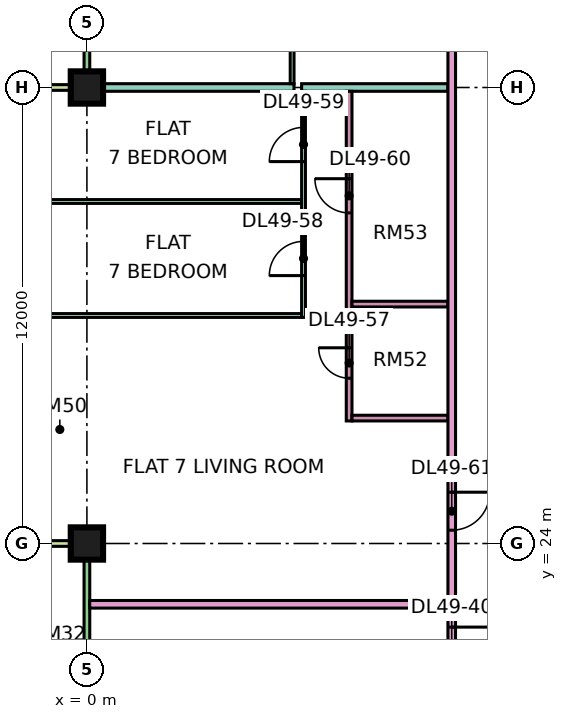
"""IFC4 building model, lengths in metres.
Left out: names, types, materials, properties, quantities, classifications, styles, units other than length and angle.
Written with IfcOpenShell. Run it as: python <this file> out.ifc"""

import sys

from ifc_helpers import new_model, si_unit, direction, frame, frame_2d, origin, origin_2d, place, context, subcontext, project, spatial, rectangle, extrude, element, fill, save


model = new_model("IFC4")
c1 = context("Model", 3, precision=1e-05, world=origin(), true_north=direction((0.0, 1.0)))
c2 = subcontext(c1, "Body", "Model", "MODEL_VIEW")
j1 = project(units=[si_unit("LENGTHUNIT", "METRE"), si_unit("PLANEANGLEUNIT", "RADIAN")], contexts=[c1])
p1 = place(None, origin())
s1 = spatial("IfcSite", under=j1, at=p1, CompositionType="ELEMENT")
p2 = place(p1, origin())
s2 = spatial("IfcBuilding", under=s1, at=p2, CompositionType="ELEMENT")
p3 = place(p2, frame((0.0, 0.0, 211.65)))
s3 = spatial("IfcBuildingStorey", under=s2, at=p3, CompositionType="ELEMENT", Elevation=211.65)
p4 = place(p3, frame((0.0, 24.0, 0.0), z_axis=(0.0, 0.0, 1.0), x_axis=(1.0, 0.0, 0.0)))
e1 = element("IfcColumn", 1, at=p4, inside=s3, PredefinedType="COLUMN", context=c2, shape_type="SweptSolid", body=[
    extrude(rectangle(XDim=0.85, YDim=0.85, at=origin_2d()), origin(), (0.0, 0.0, 1.0), 3.75),
])
p5 = place(p3, frame((0.0, 36.0, 0.0), z_axis=(0.0, 0.0, 1.0), x_axis=(1.0, 0.0, 0.0)))
e2 = element("IfcColumn", 2, at=p5, inside=s3, PredefinedType="COLUMN", context=c2, shape_type="SweptSolid", body=[
    extrude(rectangle(XDim=0.85, YDim=0.85, at=origin_2d()), origin(), (0.0, 0.0, 1.0), 3.75),
])
p6 = place(p3, frame((0.0, 47.925, 0.0), z_axis=(0.0, 0.0, 1.0), x_axis=(0.0, -1.0, 0.0)))
e3 = element("IfcWall", 3, at=p6, inside=s3, PredefinedType="SOLIDWALL", context=c2, shape_type="SweptSolid", body=[
    extrude(rectangle(XDim=11.85, YDim=0.15, at=frame_2d((5.925, 0.0))), origin(), (0.0, 0.0, 1.0), 3.35),
])
p7 = place(p6, frame((0.6, 0.0, 0.45)))
e4 = element("IfcOpeningElement", 4, at=p7, cuts=e3, PredefinedType="OPENING", context=c2, shape_type="SweptSolid", body=[
    extrude(rectangle(XDim=1.2, YDim=2.4, at=frame_2d((0.6, 1.2))), frame((0.0, 0.085, 0.0), z_axis=(0.0, -1.0, 0.0), x_axis=(1.0, 0.0, 0.0)), (0.0, 0.0, 1.0), 0.17),
])
p8 = place(p6, frame((4.087, 0.0, 0.0)))
e5 = element("IfcOpeningElement", 5, at=p8, cuts=e3, PredefinedType="OPENING", context=c2, shape_type="SweptSolid", body=[
    extrude(rectangle(XDim=1.2, YDim=2.4, at=frame_2d((0.6, 1.2))), frame((0.0, 0.085, 0.0), z_axis=(0.0, -1.0, 0.0), x_axis=(1.0, 0.0, 0.0)), (0.0, 0.0, 1.0), 0.17),
])
p9 = place(p6, frame((6.525, 0.0, 0.45)))
e6 = element("IfcOpeningElement", 6, at=p9, cuts=e3, PredefinedType="OPENING", context=c2, shape_type="SweptSolid", body=[
    extrude(rectangle(XDim=1.8, YDim=2.4, at=frame_2d((0.9, 1.2))), frame((0.0, 0.085, 0.0), z_axis=(0.0, -1.0, 0.0), x_axis=(1.0, 0.0, 0.0)), (0.0, 0.0, 1.0), 0.17),
])
p10 = place(p6, frame((9.562, 0.0, 0.45)))
e7 = element("IfcOpeningElement", 7, at=p10, cuts=e3, PredefinedType="OPENING", context=c2, shape_type="SweptSolid", body=[
    extrude(rectangle(XDim=1.2, YDim=2.4, at=frame_2d((0.6, 1.2))), frame((0.0, 0.085, 0.0), z_axis=(0.0, -1.0, 0.0), x_axis=(1.0, 0.0, 0.0)), (0.0, 0.0, 1.0), 0.17),
])
p11 = place(p3, frame((-1.5, 36.0, 0.0), z_axis=(0.0, 0.0, 1.0), x_axis=(1.0, 0.0, 0.0)))
e8 = element("IfcWall", 8, at=p11, inside=s3, PredefinedType="SOLIDWALL", context=c2, shape_type="SweptSolid", body=[
    extrude(rectangle(XDim=1.5, YDim=0.15, at=frame_2d((0.75, 0.0))), origin(), (0.0, 0.0, 1.0), 3.35),
])
p12 = place(p3, frame((0.0, 23.925, 0.0), z_axis=(0.0, 0.0, 1.0), x_axis=(0.0, -1.0, 0.0)))
e9 = element("IfcWall", 9, at=p12, inside=s3, PredefinedType="SOLIDWALL", context=c2, shape_type="SweptSolid", body=[
    extrude(rectangle(XDim=11.35, YDim=0.15, at=frame_2d((5.675, 0.0))), origin(), (0.0, 0.0, 1.0), 3.35),
])
p13 = place(p12, frame((6.738, 0.0, 0.0)))
e10 = element("IfcOpeningElement", 10, at=p13, cuts=e9, PredefinedType="OPENING", context=c2, shape_type="SweptSolid", body=[
    extrude(rectangle(XDim=1.8, YDim=2.4, at=frame_2d((0.9, 1.2))), frame((0.0, 0.085, 0.0), z_axis=(0.0, -1.0, 0.0), x_axis=(1.0, 0.0, 0.0)), (0.0, 0.0, 1.0), 0.17),
])
p14 = place(p3, frame((-1.5, 24.0, 0.0), z_axis=(0.0, 0.0, 1.0), x_axis=(1.0, 0.0, 0.0)))
e11 = element("IfcWall", 11, at=p14, inside=s3, PredefinedType="SOLIDWALL", context=c2, shape_type="SweptSolid", body=[
    extrude(rectangle(XDim=1.5, YDim=0.15, at=frame_2d((0.75, 0.0))), origin(), (0.0, 0.0, 1.0), 3.35),
])
p15 = place(p3, frame((-1.351, 33.0, 0.0), z_axis=(0.0, 0.0, 1.0), x_axis=(1.0, 0.0, 0.0)))
e12 = element("IfcWall", 12, at=p15, inside=s3, PredefinedType="PARTITIONING", context=c2, shape_type="SweptSolid", body=[
    extrude(rectangle(XDim=7.001, YDim=0.1, at=frame_2d((3.5, 0.0))), origin(), (0.0, 0.0, 1.0), 3.35),
])
p16 = place(p3, frame((-1.35, 30.0, 0.0), z_axis=(0.0, 0.0, 1.0), x_axis=(1.0, 0.0, 0.0)))
e13 = element("IfcWall", 13, at=p16, inside=s3, PredefinedType="PARTITIONING", context=c2, shape_type="SweptSolid", body=[
    extrude(rectangle(XDim=7.0, YDim=0.1, at=frame_2d((3.5, 0.0))), origin(), (0.0, 0.0, 1.0), 3.35),
])
e14 = element("IfcWall", 14, at=p5, inside=s3, PredefinedType="PARTITIONING", context=c2, shape_type="SweptSolid", body=[
    extrude(rectangle(XDim=5.45, YDim=0.2, at=frame_2d((2.725, 0.0))), origin(), (0.0, 0.0, 1.0), 3.35),
])
p17 = place(p3, frame((0.074, 22.4, 0.0), z_axis=(0.0, 0.0, 1.0), x_axis=(1.0, 0.0, 0.0)))
e15 = element("IfcWall", 15, at=p17, inside=s3, PredefinedType="PARTITIONING", context=c2, shape_type="SweptSolid", body=[
    extrude(rectangle(XDim=9.426, YDim=0.2, at=frame_2d((4.713, 0.0))), origin(), (0.0, 0.0, 1.0), 3.35),
])
p18 = place(p3, frame((5.4, 36.1, 0.0), z_axis=(0.0, 0.0, 1.0), x_axis=(0.0, 1.0, 0.0)))
e16 = element("IfcWall", 16, at=p18, inside=s3, PredefinedType="PARTITIONING", context=c2, shape_type="SweptSolid", body=[
    extrude(rectangle(XDim=26.95, YDim=0.1, at=frame_2d((13.475, 0.0))), origin(), (0.0, 0.0, 1.0), 3.35),
])
p19 = place(p18, frame((0.95, 0.0, 0.0)))
e17 = element("IfcOpeningElement", 17, at=p19, cuts=e16, PredefinedType="OPENING", context=c2, shape_type="SweptSolid", body=[
    extrude(rectangle(XDim=0.9, YDim=2.1, at=frame_2d((0.45, 1.05))), frame((0.0, 0.06, 0.0), z_axis=(0.0, -1.0, 0.0), x_axis=(1.0, 0.0, 0.0)), (0.0, 0.0, 1.0), 0.12),
])
p20 = place(p18, frame((3.95, 0.0, 0.0)))
e18 = element("IfcOpeningElement", 18, at=p20, cuts=e16, PredefinedType="OPENING", context=c2, shape_type="SweptSolid", body=[
    extrude(rectangle(XDim=0.9, YDim=2.1, at=frame_2d((0.45, 1.05))), frame((0.0, 0.06, 0.0), z_axis=(0.0, -1.0, 0.0), x_axis=(1.0, 0.0, 0.0)), (0.0, 0.0, 1.0), 0.12),
])
p21 = place(p18, frame((15.95, 0.0, 0.0)))
e19 = element("IfcOpeningElement", 19, at=p21, cuts=e16, PredefinedType="OPENING", context=c2, shape_type="SweptSolid", body=[
    extrude(rectangle(XDim=0.9, YDim=2.1, at=frame_2d((0.45, 1.05))), frame((0.0, 0.06, 0.0), z_axis=(0.0, -1.0, 0.0), x_axis=(1.0, 0.0, 0.0)), (0.0, 0.0, 1.0), 0.12),
])
p22 = place(p18, frame((18.95, 0.0, 0.0)))
e20 = element("IfcOpeningElement", 20, at=p22, cuts=e16, PredefinedType="OPENING", context=c2, shape_type="SweptSolid", body=[
    extrude(rectangle(XDim=0.9, YDim=2.1, at=frame_2d((0.45, 1.05))), frame((0.0, 0.06, 0.0), z_axis=(0.0, -1.0, 0.0), x_axis=(1.0, 0.0, 0.0)), (0.0, 0.0, 1.0), 0.12),
])
p23 = place(p18, frame((21.95, 0.0, 0.0)))
e21 = element("IfcOpeningElement", 21, at=p23, cuts=e16, PredefinedType="OPENING", context=c2, shape_type="SweptSolid", body=[
    extrude(rectangle(XDim=0.9, YDim=2.1, at=frame_2d((0.45, 1.05))), frame((0.0, 0.06, 0.0), z_axis=(0.0, -1.0, 0.0), x_axis=(1.0, 0.0, 0.0)), (0.0, 0.0, 1.0), 0.12),
])
p24 = place(p18, frame((9.95, 0.0, 0.0)))
e22 = element("IfcOpeningElement", 22, at=p24, cuts=e16, PredefinedType="OPENING", context=c2, shape_type="SweptSolid", body=[
    extrude(rectangle(XDim=0.9, YDim=2.1, at=frame_2d((0.45, 1.05))), frame((0.0, 0.06, 0.0), z_axis=(0.0, -1.0, 0.0), x_axis=(1.0, 0.0, 0.0)), (0.0, 0.0, 1.0), 0.12),
])
p25 = place(p18, frame((24.55, 0.0, 0.0)))
e23 = element("IfcOpeningElement", 23, at=p25, cuts=e16, PredefinedType="OPENING", context=c2, shape_type="SweptSolid", body=[
    extrude(rectangle(XDim=1.6, YDim=2.1, at=frame_2d((0.8, 1.05))), frame((0.0, 0.06, 0.0), z_axis=(0.0, -1.0, 0.0), x_axis=(1.0, 0.0, 0.0)), (0.0, 0.0, 1.0), 0.12),
])
p26 = place(p3, frame((5.65, 36.0, 0.0), z_axis=(0.0, 0.0, 1.0), x_axis=(1.0, 0.0, 0.0)))
e24 = element("IfcWall", 24, at=p26, inside=s3, PredefinedType="PARTITIONING", context=c2, shape_type="SweptSolid", body=[
    extrude(rectangle(XDim=3.85, YDim=0.2, at=frame_2d((1.925, 0.0))), origin(), (0.0, 0.0, 1.0), 3.35),
])
p27 = place(p3, frame((5.7, 29.95, 0.0), z_axis=(0.0, 0.0, 1.0), x_axis=(0.0, 1.0, 0.0)))
e25 = element("IfcWall", 25, at=p27, inside=s3, PredefinedType="PARTITIONING", context=c2, shape_type="SweptSolid", body=[
    extrude(rectangle(XDim=5.95, YDim=0.1, at=frame_2d((2.975, 0.0))), origin(), (0.0, 0.0, 1.0), 3.35),
])
p28 = place(p27, frame((1.1, 0.0, 0.0)))
e26 = element("IfcOpeningElement", 26, at=p28, cuts=e25, PredefinedType="OPENING", context=c2, shape_type="SweptSolid", body=[
    extrude(rectangle(XDim=0.9, YDim=2.1, at=frame_2d((0.45, 1.05))), frame((0.0, 0.06, 0.0), z_axis=(0.0, -1.0, 0.0), x_axis=(1.0, 0.0, 0.0)), (0.0, 0.0, 1.0), 0.12),
])
p29 = place(p27, frame((4.1, 0.0, 0.0)))
e27 = element("IfcOpeningElement", 27, at=p29, cuts=e25, PredefinedType="OPENING", context=c2, shape_type="SweptSolid", body=[
    extrude(rectangle(XDim=0.9, YDim=2.1, at=frame_2d((0.45, 1.05))), frame((0.0, 0.06, 0.0), z_axis=(0.0, -1.0, 0.0), x_axis=(1.0, 0.0, 0.0)), (0.0, 0.0, 1.0), 0.12),
])
p30 = place(p3, frame((6.9, 27.225, 0.0), z_axis=(0.0, 0.0, 1.0), x_axis=(0.0, 1.0, 0.0)))
e28 = element("IfcWall", 28, at=p30, inside=s3, PredefinedType="PARTITIONING", context=c2, shape_type="SweptSolid", body=[
    extrude(rectangle(XDim=8.675, YDim=0.15, at=frame_2d((4.337, 0.0))), origin(), (0.0, 0.0, 1.0), 3.35),
])
p31 = place(p30, frame((1.125, 0.0, 0.0)))
e29 = element("IfcOpeningElement", 29, at=p31, cuts=e28, PredefinedType="OPENING", context=c2, shape_type="SweptSolid", body=[
    extrude(rectangle(XDim=0.8, YDim=2.1, at=frame_2d((0.4, 1.05))), frame((0.0, 0.085, 0.0), z_axis=(0.0, -1.0, 0.0), x_axis=(1.0, 0.0, 0.0)), (0.0, 0.0, 1.0), 0.17),
])
p32 = place(p30, frame((5.475, 0.0, 0.0)))
e30 = element("IfcOpeningElement", 30, at=p32, cuts=e28, PredefinedType="OPENING", context=c2, shape_type="SweptSolid", body=[
    extrude(rectangle(XDim=0.9, YDim=2.1, at=frame_2d((0.45, 1.05))), frame((0.0, 0.085, 0.0), z_axis=(0.0, -1.0, 0.0), x_axis=(1.0, 0.0, 0.0)), (0.0, 0.0, 1.0), 0.17),
])
for number, where, z_axis, x_axis in (
    (31, (6.975, 27.3, 0.0), (0.0, 0.0, 1.0), (1.0, 0.0, 0.0)),
    (32, (6.975, 30.3, 0.0), (0.0, 0.0, 1.0), (1.0, 0.0, 0.0)),
):
    element("IfcWall", number, at=place(p3, frame(where, z_axis=z_axis, x_axis=x_axis)), inside=s3, PredefinedType="PARTITIONING", context=c2, shape_type="SweptSolid", body=[
        extrude(rectangle(XDim=2.525, YDim=0.15, at=frame_2d((1.262, 0.0))), origin(), (0.0, 0.0, 1.0), 3.35),
    ])
p33 = place(p3, frame((9.6, 20.0, 0.0), z_axis=(0.0, 0.0, 1.0), x_axis=(0.0, 1.0, 0.0)))
e33 = element("IfcWall", 33, at=p33, inside=s3, PredefinedType="PARTITIONING", context=c2, shape_type="SweptSolid", body=[
    extrude(rectangle(XDim=44.35, YDim=0.2, at=frame_2d((22.175, 0.0))), origin(), (0.0, 0.0, 1.0), 3.35),
])
p34 = place(p33, frame((17.25, 0.0, 0.0)))
e34 = element("IfcOpeningElement", 34, at=p34, cuts=e33, PredefinedType="OPENING", context=c2, shape_type="SweptSolid", body=[
    extrude(rectangle(XDim=1.0, YDim=2.1, at=frame_2d((0.5, 1.05))), frame((0.0, 0.11, 0.0), z_axis=(0.0, -1.0, 0.0), x_axis=(1.0, 0.0, 0.0)), (0.0, 0.0, 1.0), 0.22),
])
p35 = place(p33, frame((0.6, 0.0, 0.0)))
e35 = element("IfcOpeningElement", 35, at=p35, cuts=e33, PredefinedType="OPENING", context=c2, shape_type="SweptSolid", body=[
    extrude(rectangle(XDim=1.2, YDim=2.1, at=frame_2d((0.6, 1.05))), frame((0.0, 0.11, 0.0), z_axis=(0.0, -1.0, 0.0), x_axis=(1.0, 0.0, 0.0)), (0.0, 0.0, 1.0), 0.22),
])
p36 = place(p33, frame((4.35, 0.0, 0.0)))
e36 = element("IfcOpeningElement", 36, at=p36, cuts=e33, PredefinedType="OPENING", context=c2, shape_type="SweptSolid", body=[
    extrude(rectangle(XDim=1.0, YDim=2.1, at=frame_2d((0.5, 1.05))), frame((0.0, 0.11, 0.0), z_axis=(0.0, -1.0, 0.0), x_axis=(1.0, 0.0, 0.0)), (0.0, 0.0, 1.0), 0.22),
])
p37 = place(p35, origin())
e37 = element("IfcDoor", 37, at=p37, inside=s3, OperationType="SINGLE_SWING_RIGHT", PredefinedType="DOOR", context=c2, shape_type="SweptSolid", body=[
    extrude(rectangle(XDim=1.2, YDim=2.1, at=frame_2d((0.6, 1.05))), frame((0.0, 0.025, 0.0), z_axis=(0.0, -1.0, 0.0), x_axis=(1.0, 0.0, 0.0)), (0.0, 0.0, 1.0), 0.05),
])
fill(e35, e37)
p38 = place(p31, frame((0.8, 0.0, 0.0), z_axis=(0.0, 0.0, 1.0), x_axis=(-1.0, 0.0, 0.0)))
e38 = element("IfcDoor", 38, at=p38, inside=s3, OperationType="SINGLE_SWING_RIGHT", PredefinedType="DOOR", context=c2, shape_type="SweptSolid", body=[
    extrude(rectangle(XDim=0.8, YDim=2.1, at=frame_2d((0.4, 1.05))), frame((0.0, 0.025, 0.0), z_axis=(0.0, -1.0, 0.0), x_axis=(1.0, 0.0, 0.0)), (0.0, 0.0, 1.0), 0.05),
])
fill(e29, e38)
p39 = place(p28, origin())
e39 = element("IfcDoor", 39, at=p39, inside=s3, OperationType="SINGLE_SWING_LEFT", PredefinedType="DOOR", context=c2, shape_type="SweptSolid", body=[
    extrude(rectangle(XDim=0.9, YDim=2.1, at=frame_2d((0.45, 1.05))), frame((0.0, 0.025, 0.0), z_axis=(0.0, -1.0, 0.0), x_axis=(1.0, 0.0, 0.0)), (0.0, 0.0, 1.0), 0.05),
])
fill(e26, e39)
p40 = place(p29, origin())
e40 = element("IfcDoor", 40, at=p40, inside=s3, OperationType="SINGLE_SWING_LEFT", PredefinedType="DOOR", context=c2, shape_type="SweptSolid", body=[
    extrude(rectangle(XDim=0.9, YDim=2.1, at=frame_2d((0.45, 1.05))), frame((0.0, 0.025, 0.0), z_axis=(0.0, -1.0, 0.0), x_axis=(1.0, 0.0, 0.0)), (0.0, 0.0, 1.0), 0.05),
])
fill(e27, e40)
p41 = place(p32, frame((0.9, 0.0, 0.0), z_axis=(0.0, 0.0, 1.0), x_axis=(-1.0, 0.0, 0.0)))
e41 = element("IfcDoor", 41, at=p41, inside=s3, OperationType="SINGLE_SWING_RIGHT", PredefinedType="DOOR", context=c2, shape_type="SweptSolid", body=[
    extrude(rectangle(XDim=0.9, YDim=2.1, at=frame_2d((0.45, 1.05))), frame((0.0, 0.025, 0.0), z_axis=(0.0, -1.0, 0.0), x_axis=(1.0, 0.0, 0.0)), (0.0, 0.0, 1.0), 0.05),
])
fill(e30, e41)
p42 = place(p36, origin())
e42 = element("IfcDoor", 42, at=p42, inside=s3, OperationType="SINGLE_SWING_RIGHT", PredefinedType="DOOR", context=c2, shape_type="SweptSolid", body=[
    extrude(rectangle(XDim=1.0, YDim=2.1, at=frame_2d((0.5, 1.05))), frame((0.0, 0.025, 0.0), z_axis=(0.0, -1.0, 0.0), x_axis=(1.0, 0.0, 0.0)), (0.0, 0.0, 1.0), 0.05),
])
fill(e36, e42)
save(model, sys.argv[1])
